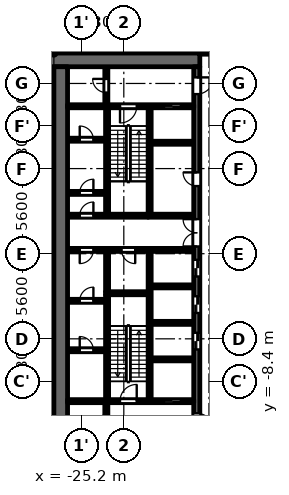
"""IFC4 building model, lengths in metres.
Left out: names, types, materials, properties, quantities, classifications, styles, units other than length and angle.
Written with IfcOpenShell. Run it as: python <this file> out.ifc"""

import sys

from ifc_helpers import new_model, si_unit, direction, frame, frame_2d, origin, place, context, subcontext, project, spatial, rectangle, extrude, element, fill, save


model = new_model("IFC4")
c1 = context("Model", 3, precision=1e-05, world=origin(), true_north=direction((0.0, 1.0)))
c2 = subcontext(c1, "Body", "Model", "MODEL_VIEW")
j1 = project(units=[si_unit("LENGTHUNIT", "METRE"), si_unit("PLANEANGLEUNIT", "RADIAN")], contexts=[c1])
p1 = place(None, origin())
s1 = spatial("IfcSite", under=j1, at=p1, CompositionType="ELEMENT")
p2 = place(p1, origin())
s2 = spatial("IfcBuilding", under=s1, at=p2, CompositionType="ELEMENT")
p3 = place(p2, frame((0.0, 0.0, 11.3)))
s3 = spatial("IfcBuildingStorey", under=s2, at=p3, CompositionType="ELEMENT", Elevation=11.3)
p4 = place(p3, frame((-23.5, -2.5, 0.0), z_axis=(0.0, 0.0, 1.0), x_axis=(0.0, 1.0, 0.0)))
e1 = element("IfcWall", 1, at=p4, inside=s3, PredefinedType="PARTITIONING", context=c2, shape_type="SweptSolid", body=[
    extrude(rectangle(XDim=2.65, YDim=0.2, at=frame_2d((1.325, 0.0))), origin(), (0.0, 0.0, 1.0), 4.45),
])
p5 = place(p3, frame((-20.7, 2.6, 0.0), z_axis=(0.0, 0.0, 1.0), x_axis=(0.0, 1.0, 0.0)))
e2 = element("IfcWall", 2, at=p5, inside=s3, PredefinedType="SHEAR", context=c2, shape_type="SweptSolid", body=[
    extrude(rectangle(XDim=7.0, YDim=0.2, at=frame_2d((3.5, 0.0))), origin(), (0.0, 0.0, 1.0), 4.45),
])
p6 = place(p3, frame((-20.7, -9.6, 0.0), z_axis=(0.0, 0.0, 1.0), x_axis=(0.0, 1.0, 0.0)))
e3 = element("IfcWall", 3, at=p6, inside=s3, PredefinedType="SHEAR", context=c2, shape_type="SweptSolid", body=[
    extrude(rectangle(XDim=9.75, YDim=0.2, at=frame_2d((4.875, 0.0))), origin(), (0.0, 0.0, 1.0), 4.45),
])
p7 = place(p3, frame((-20.8, 2.5, 0.0), z_axis=(0.0, 0.0, 1.0), x_axis=(-1.0, 0.0, 0.0)))
e4 = element("IfcWall", 4, at=p7, inside=s3, PredefinedType="SHEAR", context=c2, shape_type="SweptSolid", body=[
    extrude(rectangle(XDim=5.3, YDim=0.2, at=frame_2d((2.65, 0.0))), origin(), (0.0, 0.0, 1.0), 4.45),
])
p8 = place(p7, frame((3.6, 0.0, 0.0)))
e5 = element("IfcOpeningElement", 5, at=p8, cuts=e4, PredefinedType="OPENING", context=c2, shape_type="SweptSolid", body=[
    extrude(rectangle(XDim=0.9, YDim=2.1, at=frame_2d((0.45, 1.05))), frame((0.0, 0.11, 0.0), z_axis=(0.0, -1.0, 0.0), x_axis=(1.0, 0.0, 0.0)), (0.0, 0.0, 1.0), 0.22),
])
p9 = place(p3, frame((-20.8, 0.25, 0.0), z_axis=(0.0, 0.0, 1.0), x_axis=(-1.0, 0.0, 0.0)))
e6 = element("IfcWall", 6, at=p9, inside=s3, PredefinedType="PARTITIONING", context=c2, shape_type="SweptSolid", body=[
    extrude(rectangle(XDim=5.3, YDim=0.2, at=frame_2d((2.65, 0.0))), origin(), (0.0, 0.0, 1.0), 4.45),
])
p10 = place(p9, frame((0.85, 0.0, 0.0)))
e7 = element("IfcOpeningElement", 7, at=p10, cuts=e6, PredefinedType="OPENING", context=c2, shape_type="SweptSolid", body=[
    extrude(rectangle(XDim=0.9, YDim=2.1, at=frame_2d((0.45, 1.05))), frame((0.0, 0.11, 0.0), z_axis=(0.0, -1.0, 0.0), x_axis=(1.0, 0.0, 0.0)), (0.0, 0.0, 1.0), 0.22),
])
p11 = place(p9, frame((3.6, 0.0, 0.0)))
e8 = element("IfcOpeningElement", 8, at=p11, cuts=e6, PredefinedType="OPENING", context=c2, shape_type="SweptSolid", body=[
    extrude(rectangle(XDim=0.9, YDim=2.1, at=frame_2d((0.45, 1.05))), frame((0.0, 0.11, 0.0), z_axis=(0.0, -1.0, 0.0), x_axis=(1.0, 0.0, 0.0)), (0.0, 0.0, 1.0), 0.22),
])
p12 = place(p3, frame((-17.4, 12.75, 0.0), z_axis=(0.0, 0.0, 1.0), x_axis=(-1.0, 0.0, 0.0)))
e9 = element("IfcWall", 9, at=p12, inside=s3, PredefinedType="SHEAR", context=c2, shape_type="SweptSolid", body=[
    extrude(rectangle(XDim=10.4, YDim=0.9, at=frame_2d((5.2, 0.0))), origin(), (0.0, 0.0, 1.0), 4.45),
])
p13 = place(p3, frame((-17.6, -12.3, 0.0), z_axis=(0.0, 0.0, 1.0), x_axis=(0.0, 1.0, 0.0)))
e10 = element("IfcWall", 10, at=p13, inside=s3, PredefinedType="SHEAR", context=c2, shape_type="SweptSolid", body=[
    extrude(rectangle(XDim=24.6, YDim=0.4, at=frame_2d((12.3, 0.0))), origin(), (0.0, 0.0, 1.0), 4.45),
])
p14 = place(p13, frame((6.0, 0.0, 0.0)))
e11 = element("IfcOpeningElement", 11, at=p14, cuts=e10, PredefinedType="OPENING", context=c2, shape_type="SweptSolid", body=[
    extrude(rectangle(XDim=1.1, YDim=2.1, at=frame_2d((0.55, 1.05))), frame((0.0, 0.21, 0.0), z_axis=(0.0, -1.0, 0.0), x_axis=(1.0, 0.0, 0.0)), (0.0, 0.0, 1.0), 0.42),
])
p15 = place(p13, frame((8.4, 0.0, 0.0)))
e12 = element("IfcOpeningElement", 12, at=p15, cuts=e10, PredefinedType="OPENING", context=c2, shape_type="SweptSolid", body=[
    extrude(rectangle(XDim=1.1, YDim=2.1, at=frame_2d((0.55, 1.05))), frame((0.0, 0.21, 0.0), z_axis=(0.0, -1.0, 0.0), x_axis=(1.0, 0.0, 0.0)), (0.0, 0.0, 1.0), 0.42),
])
p16 = place(p13, frame((10.8, 0.0, 0.0)))
e13 = element("IfcOpeningElement", 13, at=p16, cuts=e10, PredefinedType="OPENING", context=c2, shape_type="SweptSolid", body=[
    extrude(rectangle(XDim=1.1, YDim=2.1, at=frame_2d((0.55, 1.05))), frame((0.0, 0.21, 0.0), z_axis=(0.0, -1.0, 0.0), x_axis=(1.0, 0.0, 0.0)), (0.0, 0.0, 1.0), 0.42),
])
p17 = place(p13, frame((16.75, 0.0, 0.0)))
e14 = element("IfcOpeningElement", 14, at=p17, cuts=e10, PredefinedType="OPENING", context=c2, shape_type="SweptSolid", body=[
    extrude(rectangle(XDim=0.9, YDim=2.1, at=frame_2d((0.45, 1.05))), frame((0.0, 0.21, 0.0), z_axis=(0.0, -1.0, 0.0), x_axis=(1.0, 0.0, 0.0)), (0.0, 0.0, 1.0), 0.42),
])
p18 = place(p13, frame((22.8, 0.0, 0.0)))
e15 = element("IfcOpeningElement", 15, at=p18, cuts=e10, PredefinedType="OPENING", context=c2, shape_type="SweptSolid", body=[
    extrude(rectangle(XDim=1.1, YDim=2.1, at=frame_2d((0.55, 1.05))), frame((0.0, 0.21, 0.0), z_axis=(0.0, -1.0, 0.0), x_axis=(1.0, 0.0, 0.0)), (0.0, 0.0, 1.0), 0.42),
])
p19 = place(p13, frame((0.7, 0.0, 0.0)))
e16 = element("IfcOpeningElement", 16, at=p19, cuts=e10, PredefinedType="OPENING", context=c2, shape_type="SweptSolid", body=[
    extrude(rectangle(XDim=1.1, YDim=2.1, at=frame_2d((0.55, 1.05))), frame((0.0, 0.21, 0.0), z_axis=(0.0, -1.0, 0.0), x_axis=(1.0, 0.0, 0.0)), (0.0, 0.0, 1.0), 0.42),
])
p20 = place(p13, frame((12.775, 0.0, 0.0)))
e17 = element("IfcOpeningElement", 17, at=p20, cuts=e10, PredefinedType="OPENING", context=c2, shape_type="SweptSolid", body=[
    extrude(rectangle(XDim=1.8, YDim=2.1, at=frame_2d((0.9, 1.05))), frame((0.0, 0.21, 0.0), z_axis=(0.0, -1.0, 0.0), x_axis=(1.0, 0.0, 0.0)), (0.0, 0.0, 1.0), 0.42),
])
p21 = place(p3, frame((-26.55, -12.3, 0.0), z_axis=(0.0, 0.0, 1.0), x_axis=(0.0, 1.0, 0.0)))
e18 = element("IfcWall", 18, at=p21, inside=s3, PredefinedType="SHEAR", context=c2, shape_type="SweptSolid", body=[
    extrude(rectangle(XDim=24.6, YDim=0.9, at=frame_2d((12.3, 0.0))), origin(), (0.0, 0.0, 1.0), 4.45),
])
p22 = place(p3, frame((-23.55, 9.8, 0.0), z_axis=(0.0, 0.0, 1.0), x_axis=(0.0, 1.0, 0.0)))
e19 = element("IfcWall", 19, at=p22, inside=s3, PredefinedType="PARTITIONING", context=c2, shape_type="SweptSolid", body=[
    extrude(rectangle(XDim=2.5, YDim=0.2, at=frame_2d((1.25, 0.0))), origin(), (0.0, 0.0, 1.0), 4.45),
])
p23 = place(p22, frame((0.8, 0.0, 0.0)))
e20 = element("IfcOpeningElement", 20, at=p23, cuts=e19, PredefinedType="OPENING", context=c2, shape_type="SweptSolid", body=[
    extrude(rectangle(XDim=0.9, YDim=2.1, at=frame_2d((0.45, 1.05))), frame((0.0, 0.11, 0.0), z_axis=(0.0, -1.0, 0.0), x_axis=(1.0, 0.0, 0.0)), (0.0, 0.0, 1.0), 0.22),
])
p24 = place(p3, frame((-23.55, -12.3, 0.0), z_axis=(0.0, 0.0, 1.0), x_axis=(0.0, 1.0, 0.0)))
e21 = element("IfcWall", 21, at=p24, inside=s3, PredefinedType="PARTITIONING", context=c2, shape_type="SweptSolid", body=[
    extrude(rectangle(XDim=2.5, YDim=0.2, at=frame_2d((1.25, 0.0))), origin(), (0.0, 0.0, 1.0), 4.45),
])
p25 = place(p24, frame((0.8, 0.0, 0.0)))
e22 = element("IfcOpeningElement", 22, at=p25, cuts=e21, PredefinedType="OPENING", context=c2, shape_type="SweptSolid", body=[
    extrude(rectangle(XDim=0.9, YDim=2.1, at=frame_2d((0.45, 1.05))), frame((0.0, 0.11, 0.0), z_axis=(0.0, -1.0, 0.0), x_axis=(1.0, 0.0, 0.0)), (0.0, 0.0, 1.0), 0.22),
])
p26 = place(p3, frame((-23.6, -6.35, 0.0), z_axis=(0.0, 0.0, 1.0), x_axis=(-1.0, 0.0, 0.0)))
e23 = element("IfcWall", 23, at=p26, inside=s3, PredefinedType="PARTITIONING", context=c2, shape_type="SweptSolid", body=[
    extrude(rectangle(XDim=2.5, YDim=0.2, at=frame_2d((1.25, 0.0))), origin(), (0.0, 0.0, 1.0), 4.45),
])
p27 = place(p26, frame((0.8, 0.0, 0.0)))
e24 = element("IfcOpeningElement", 24, at=p27, cuts=e23, PredefinedType="OPENING", context=c2, shape_type="SweptSolid", body=[
    extrude(rectangle(XDim=0.9, YDim=2.1, at=frame_2d((0.45, 1.05))), frame((0.0, 0.11, 0.0), z_axis=(0.0, -1.0, 0.0), x_axis=(1.0, 0.0, 0.0)), (0.0, 0.0, 1.0), 0.22),
])
p28 = place(p3, frame((-23.6, -3.1, 0.0), z_axis=(0.0, 0.0, 1.0), x_axis=(-1.0, 0.0, 0.0)))
e25 = element("IfcWall", 25, at=p28, inside=s3, PredefinedType="PARTITIONING", context=c2, shape_type="SweptSolid", body=[
    extrude(rectangle(XDim=2.5, YDim=0.2, at=frame_2d((1.25, 0.0))), origin(), (0.0, 0.0, 1.0), 4.45),
])
p29 = place(p28, frame((0.8, 0.0, 0.0)))
e26 = element("IfcOpeningElement", 26, at=p29, cuts=e25, PredefinedType="OPENING", context=c2, shape_type="SweptSolid", body=[
    extrude(rectangle(XDim=0.9, YDim=2.1, at=frame_2d((0.45, 1.05))), frame((0.0, 0.11, 0.0), z_axis=(0.0, -1.0, 0.0), x_axis=(1.0, 0.0, 0.0)), (0.0, 0.0, 1.0), 0.22),
])
p30 = place(p3, frame((-23.6, 4.0, 0.0), z_axis=(0.0, 0.0, 1.0), x_axis=(-1.0, 0.0, 0.0)))
e27 = element("IfcWall", 27, at=p30, inside=s3, PredefinedType="PARTITIONING", context=c2, shape_type="SweptSolid", body=[
    extrude(rectangle(XDim=2.5, YDim=0.2, at=frame_2d((1.25, 0.0))), origin(), (0.0, 0.0, 1.0), 4.45),
])
p31 = place(p30, frame((0.8, 0.0, 0.0)))
e28 = element("IfcOpeningElement", 28, at=p31, cuts=e27, PredefinedType="OPENING", context=c2, shape_type="SweptSolid", body=[
    extrude(rectangle(XDim=0.9, YDim=2.1, at=frame_2d((0.45, 1.05))), frame((0.0, 0.11, 0.0), z_axis=(0.0, -1.0, 0.0), x_axis=(1.0, 0.0, 0.0)), (0.0, 0.0, 1.0), 0.22),
])
p32 = place(p3, frame((-23.6, 7.5, 0.0), z_axis=(0.0, 0.0, 1.0), x_axis=(-1.0, 0.0, 0.0)))
e29 = element("IfcWall", 29, at=p32, inside=s3, PredefinedType="PARTITIONING", context=c2, shape_type="SweptSolid", body=[
    extrude(rectangle(XDim=2.5, YDim=0.2, at=frame_2d((1.25, 0.0))), origin(), (0.0, 0.0, 1.0), 4.45),
])
p33 = place(p32, frame((0.8, 0.0, 0.0)))
e30 = element("IfcOpeningElement", 30, at=p33, cuts=e29, PredefinedType="OPENING", context=c2, shape_type="SweptSolid", body=[
    extrude(rectangle(XDim=0.9, YDim=2.1, at=frame_2d((0.45, 1.05))), frame((0.0, 0.11, 0.0), z_axis=(0.0, -1.0, 0.0), x_axis=(1.0, 0.0, 0.0)), (0.0, 0.0, 1.0), 0.22),
])
p34 = place(p3, frame((-17.8, -9.7, 0.0), z_axis=(0.0, 0.0, 1.0), x_axis=(-1.0, 0.0, 0.0)))
e31 = element("IfcWall", 31, at=p34, inside=s3, PredefinedType="SHEAR", context=c2, shape_type="SweptSolid", body=[
    extrude(rectangle(XDim=8.3, YDim=0.2, at=frame_2d((4.15, 0.0))), origin(), (0.0, 0.0, 1.0), 4.45),
])
p35 = place(p34, frame((0.85, 0.0, 0.0)))
e32 = element("IfcOpeningElement", 32, at=p35, cuts=e31, PredefinedType="OPENING", context=c2, shape_type="SweptSolid", body=[
    extrude(rectangle(XDim=1.1, YDim=2.1, at=frame_2d((0.55, 1.05))), frame((0.0, 0.11, 0.0), z_axis=(0.0, -1.0, 0.0), x_axis=(1.0, 0.0, 0.0)), (0.0, 0.0, 1.0), 0.22),
])
p36 = place(p34, frame((3.75, 0.0, 0.0)))
e33 = element("IfcOpeningElement", 33, at=p36, cuts=e31, PredefinedType="OPENING", context=c2, shape_type="SweptSolid", body=[
    extrude(rectangle(XDim=1.1, YDim=2.1, at=frame_2d((0.55, 1.05))), frame((0.0, 0.11, 0.0), z_axis=(0.0, -1.0, 0.0), x_axis=(1.0, 0.0, 0.0)), (0.0, 0.0, 1.0), 0.22),
])
for number, where, z_axis, x_axis in (
    (34, (-17.8, -6.95, 0.0), (0.0, 0.0, 1.0), (-1.0, 0.0, 0.0)),
    (35, (-17.8, -4.55, 0.0), (0.0, 0.0, 1.0), (-1.0, 0.0, 0.0)),
    (36, (-17.8, -2.15, 0.0), (0.0, 0.0, 1.0), (-1.0, 0.0, 0.0)),
):
    element("IfcWall", number, at=place(p3, frame(where, z_axis=z_axis, x_axis=x_axis)), inside=s3, PredefinedType="PARTITIONING", context=c2, shape_type="SweptSolid", body=[
        extrude(rectangle(XDim=2.8, YDim=0.2, at=frame_2d((1.4, 0.0))), origin(), (0.0, 0.0, 1.0), 4.45),
    ])
for number, where, z_axis, x_axis in (
    (37, (-17.8, 0.25, 0.0), (0.0, 0.0, 1.0), (-1.0, 0.0, 0.0)),
    (38, (-17.8, 2.5, 0.0), (0.0, 0.0, 1.0), (-1.0, 0.0, 0.0)),
):
    element("IfcWall", number, at=place(p3, frame(where, z_axis=z_axis, x_axis=x_axis)), inside=s3, PredefinedType="PARTITIONING", context=c2, shape_type="SweptSolid", body=[
        extrude(rectangle(XDim=3.0, YDim=0.2, at=frame_2d((1.5, 0.0))), origin(), (0.0, 0.0, 1.0), 4.45),
    ])
p37 = place(p3, frame((-17.8, 7.3, 0.0), z_axis=(0.0, 0.0, 1.0), x_axis=(-1.0, 0.0, 0.0)))
e39 = element("IfcWall", 39, at=p37, inside=s3, PredefinedType="PARTITIONING", context=c2, shape_type="SweptSolid", body=[
    extrude(rectangle(XDim=2.8, YDim=0.2, at=frame_2d((1.4, 0.0))), origin(), (0.0, 0.0, 1.0), 4.45),
])
p38 = place(p3, frame((-17.8, 9.7, 0.0), z_axis=(0.0, 0.0, 1.0), x_axis=(-1.0, 0.0, 0.0)))
e40 = element("IfcWall", 40, at=p38, inside=s3, PredefinedType="SHEAR", context=c2, shape_type="SweptSolid", body=[
    extrude(rectangle(XDim=8.3, YDim=0.2, at=frame_2d((4.15, 0.0))), origin(), (0.0, 0.0, 1.0), 4.45),
])
p39 = place(p38, frame((0.85, 0.0, 0.0)))
e41 = element("IfcOpeningElement", 41, at=p39, cuts=e40, PredefinedType="OPENING", context=c2, shape_type="SweptSolid", body=[
    extrude(rectangle(XDim=1.1, YDim=2.1, at=frame_2d((0.55, 1.05))), frame((0.0, 0.11, 0.0), z_axis=(0.0, -1.0, 0.0), x_axis=(1.0, 0.0, 0.0)), (0.0, 0.0, 1.0), 0.22),
])
p40 = place(p38, frame((3.75, 0.0, 0.0)))
e42 = element("IfcOpeningElement", 42, at=p40, cuts=e40, PredefinedType="OPENING", context=c2, shape_type="SweptSolid", body=[
    extrude(rectangle(XDim=1.1, YDim=2.1, at=frame_2d((0.55, 1.05))), frame((0.0, 0.11, 0.0), z_axis=(0.0, -1.0, 0.0), x_axis=(1.0, 0.0, 0.0)), (0.0, 0.0, 1.0), 0.22),
])
p41 = place(p3, frame((-23.5, 2.6, 0.0), z_axis=(0.0, 0.0, 1.0), x_axis=(0.0, 1.0, 0.0)))
e43 = element("IfcWall", 43, at=p41, inside=s3, PredefinedType="SHEAR", context=c2, shape_type="SweptSolid", body=[
    extrude(rectangle(XDim=7.0, YDim=0.2, at=frame_2d((3.5, 0.0))), origin(), (0.0, 0.0, 1.0), 4.45),
])
p42 = place(p3, frame((-23.5, -9.6, 0.0), z_axis=(0.0, 0.0, 1.0), x_axis=(0.0, 1.0, 0.0)))
e44 = element("IfcWall", 44, at=p42, inside=s3, PredefinedType="SHEAR", context=c2, shape_type="SweptSolid", body=[
    extrude(rectangle(XDim=6.9, YDim=0.2, at=frame_2d((3.45, 0.0))), origin(), (0.0, 0.0, 1.0), 4.45),
])
p43 = place(p3, frame((-20.8, -2.6, 0.0), z_axis=(0.0, 0.0, 1.0), x_axis=(-1.0, 0.0, 0.0)))
e45 = element("IfcWall", 45, at=p43, inside=s3, PredefinedType="SHEAR", context=c2, shape_type="SweptSolid", body=[
    extrude(rectangle(XDim=2.8, YDim=0.2, at=frame_2d((1.4, 0.0))), origin(), (0.0, 0.0, 1.0), 4.45),
])
p44 = place(p3, frame((-17.4, 13.2, 0.0), z_axis=(0.0, 0.0, 1.0), x_axis=(1.0, 0.0, 0.0)))
e46 = element("IfcWall", 46, at=p44, inside=s3, PredefinedType="PARTITIONING", context=c2, shape_type="SweptSolid", body=[
    extrude(rectangle(XDim=34.8, YDim=0.15, at=frame_2d((17.4, 0.0))), origin(), (0.0, 0.0, 1.0), 4.45),
])
p45 = place(p44, frame((3.05, 0.0, 0.0)))
e47 = element("IfcOpeningElement", 47, at=p45, cuts=e46, PredefinedType="OPENING", context=c2, shape_type="SweptSolid", body=[
    extrude(rectangle(XDim=1.8, YDim=2.1, at=frame_2d((0.9, 1.05))), frame((0.0, 0.085, 0.0), z_axis=(0.0, -1.0, 0.0), x_axis=(1.0, 0.0, 0.0)), (0.0, 0.0, 1.0), 0.17),
])
p46 = place(p44, frame((0.75, 0.0, 0.0)))
e48 = element("IfcOpeningElement", 48, at=p46, cuts=e46, PredefinedType="OPENING", context=c2, shape_type="SweptSolid", body=[
    extrude(rectangle(XDim=1.0, YDim=2.1, at=frame_2d((0.5, 1.05))), frame((0.0, 0.085, 0.0), z_axis=(0.0, -1.0, 0.0), x_axis=(1.0, 0.0, 0.0)), (0.0, 0.0, 1.0), 0.17),
])
p47 = place(p44, frame((33.15, 0.0, 0.0)))
e49 = element("IfcOpeningElement", 49, at=p47, cuts=e46, PredefinedType="OPENING", context=c2, shape_type="SweptSolid", body=[
    extrude(rectangle(XDim=1.0, YDim=2.1, at=frame_2d((0.5, 1.05))), frame((0.0, 0.085, 0.0), z_axis=(0.0, -1.0, 0.0), x_axis=(1.0, 0.0, 0.0)), (0.0, 0.0, 1.0), 0.17),
])
p48 = place(p35, origin())
e50 = element("IfcDoor", 50, at=p48, inside=s3, OperationType="DOUBLE_DOOR_SLIDING", PredefinedType="DOOR", context=c2, shape_type="SweptSolid", body=[
    extrude(rectangle(XDim=1.1, YDim=2.1, at=frame_2d((0.55, 1.05))), frame((0.0, 0.025, 0.0), z_axis=(0.0, -1.0, 0.0), x_axis=(1.0, 0.0, 0.0)), (0.0, 0.0, 1.0), 0.05),
])
fill(e32, e50)
p49 = place(p14, origin())
e51 = element("IfcDoor", 51, at=p49, inside=s3, OperationType="DOUBLE_DOOR_SLIDING", PredefinedType="DOOR", context=c2, shape_type="SweptSolid", body=[
    extrude(rectangle(XDim=1.1, YDim=2.1, at=frame_2d((0.55, 1.05))), frame((0.0, 0.025, 0.0), z_axis=(0.0, -1.0, 0.0), x_axis=(1.0, 0.0, 0.0)), (0.0, 0.0, 1.0), 0.05),
])
fill(e11, e51)
p50 = place(p15, origin())
e52 = element("IfcDoor", 52, at=p50, inside=s3, OperationType="DOUBLE_DOOR_SLIDING", PredefinedType="DOOR", context=c2, shape_type="SweptSolid", body=[
    extrude(rectangle(XDim=1.1, YDim=2.1, at=frame_2d((0.55, 1.05))), frame((0.0, 0.025, 0.0), z_axis=(0.0, -1.0, 0.0), x_axis=(1.0, 0.0, 0.0)), (0.0, 0.0, 1.0), 0.05),
])
fill(e12, e52)
p51 = place(p16, origin())
e53 = element("IfcDoor", 53, at=p51, inside=s3, OperationType="DOUBLE_DOOR_SLIDING", PredefinedType="DOOR", context=c2, shape_type="SweptSolid", body=[
    extrude(rectangle(XDim=1.1, YDim=2.1, at=frame_2d((0.55, 1.05))), frame((0.0, 0.025, 0.0), z_axis=(0.0, -1.0, 0.0), x_axis=(1.0, 0.0, 0.0)), (0.0, 0.0, 1.0), 0.05),
])
fill(e13, e53)
p52 = place(p17, origin())
e54 = element("IfcDoor", 54, at=p52, inside=s3, OperationType="SINGLE_SWING_LEFT", PredefinedType="DOOR", context=c2, shape_type="SweptSolid", body=[
    extrude(rectangle(XDim=0.9, YDim=2.1, at=frame_2d((0.45, 1.05))), frame((0.0, 0.025, 0.0), z_axis=(0.0, -1.0, 0.0), x_axis=(1.0, 0.0, 0.0)), (0.0, 0.0, 1.0), 0.05),
])
fill(e14, e54)
p53 = place(p39, origin())
e55 = element("IfcDoor", 55, at=p53, inside=s3, OperationType="DOUBLE_DOOR_SLIDING", PredefinedType="DOOR", context=c2, shape_type="SweptSolid", body=[
    extrude(rectangle(XDim=1.1, YDim=2.1, at=frame_2d((0.55, 1.05))), frame((0.0, 0.025, 0.0), z_axis=(0.0, -1.0, 0.0), x_axis=(1.0, 0.0, 0.0)), (0.0, 0.0, 1.0), 0.05),
])
fill(e41, e55)
p54 = place(p18, origin())
e56 = element("IfcDoor", 56, at=p54, inside=s3, OperationType="SINGLE_SWING_RIGHT", PredefinedType="DOOR", context=c2, shape_type="SweptSolid", body=[
    extrude(rectangle(XDim=1.1, YDim=2.1, at=frame_2d((0.55, 1.05))), frame((0.0, 0.025, 0.0), z_axis=(0.0, -1.0, 0.0), x_axis=(1.0, 0.0, 0.0)), (0.0, 0.0, 1.0), 0.05),
])
fill(e15, e56)
p55 = place(p19, origin())
e57 = element("IfcDoor", 57, at=p55, inside=s3, OperationType="SINGLE_SWING_LEFT", PredefinedType="DOOR", context=c2, shape_type="SweptSolid", body=[
    extrude(rectangle(XDim=1.1, YDim=2.1, at=frame_2d((0.55, 1.05))), frame((0.0, 0.025, 0.0), z_axis=(0.0, -1.0, 0.0), x_axis=(1.0, 0.0, 0.0)), (0.0, 0.0, 1.0), 0.05),
])
fill(e16, e57)
p56 = place(p23, origin())
e58 = element("IfcDoor", 58, at=p56, inside=s3, OperationType="SINGLE_SWING_LEFT", PredefinedType="DOOR", context=c2, shape_type="SweptSolid", body=[
    extrude(rectangle(XDim=0.9, YDim=2.1, at=frame_2d((0.45, 1.05))), frame((0.0, 0.025, 0.0), z_axis=(0.0, -1.0, 0.0), x_axis=(1.0, 0.0, 0.0)), (0.0, 0.0, 1.0), 0.05),
])
fill(e20, e58)
p57 = place(p40, origin())
e59 = element("IfcDoor", 59, at=p57, inside=s3, OperationType="SINGLE_SWING_LEFT", PredefinedType="DOOR", context=c2, shape_type="SweptSolid", body=[
    extrude(rectangle(XDim=1.1, YDim=2.1, at=frame_2d((0.55, 1.05))), frame((0.0, 0.025, 0.0), z_axis=(0.0, -1.0, 0.0), x_axis=(1.0, 0.0, 0.0)), (0.0, 0.0, 1.0), 0.05),
])
fill(e42, e59)
p58 = place(p36, origin())
e60 = element("IfcDoor", 60, at=p58, inside=s3, OperationType="SINGLE_SWING_LEFT", PredefinedType="DOOR", context=c2, shape_type="SweptSolid", body=[
    extrude(rectangle(XDim=1.1, YDim=2.1, at=frame_2d((0.55, 1.05))), frame((0.0, 0.025, 0.0), z_axis=(0.0, -1.0, 0.0), x_axis=(1.0, 0.0, 0.0)), (0.0, 0.0, 1.0), 0.05),
])
fill(e33, e60)
p59 = place(p20, origin())
e61 = element("IfcDoor", 61, at=p59, inside=s3, OperationType="DOUBLE_DOOR_SINGLE_SWING", PredefinedType="DOOR", context=c2, shape_type="SweptSolid", body=[
    extrude(rectangle(XDim=1.8, YDim=2.1, at=frame_2d((0.9, 1.05))), frame((0.0, 0.025, 0.0), z_axis=(0.0, -1.0, 0.0), x_axis=(1.0, 0.0, 0.0)), (0.0, 0.0, 1.0), 0.05),
])
fill(e17, e61)
p60 = place(p10, origin())
e62 = element("IfcDoor", 62, at=p60, inside=s3, OperationType="SINGLE_SWING_RIGHT", PredefinedType="DOOR", context=c2, shape_type="SweptSolid", body=[
    extrude(rectangle(XDim=0.9, YDim=2.1, at=frame_2d((0.45, 1.05))), frame((0.0, 0.025, 0.0), z_axis=(0.0, -1.0, 0.0), x_axis=(1.0, 0.0, 0.0)), (0.0, 0.0, 1.0), 0.05),
])
fill(e7, e62)
p61 = place(p27, origin())
e63 = element("IfcDoor", 63, at=p61, inside=s3, OperationType="SINGLE_SWING_RIGHT", PredefinedType="DOOR", context=c2, shape_type="SweptSolid", body=[
    extrude(rectangle(XDim=0.9, YDim=2.1, at=frame_2d((0.45, 1.05))), frame((0.0, 0.025, 0.0), z_axis=(0.0, -1.0, 0.0), x_axis=(1.0, 0.0, 0.0)), (0.0, 0.0, 1.0), 0.05),
])
fill(e24, e63)
p62 = place(p29, origin())
e64 = element("IfcDoor", 64, at=p62, inside=s3, OperationType="SINGLE_SWING_LEFT", PredefinedType="DOOR", context=c2, shape_type="SweptSolid", body=[
    extrude(rectangle(XDim=0.9, YDim=2.1, at=frame_2d((0.45, 1.05))), frame((0.0, 0.025, 0.0), z_axis=(0.0, -1.0, 0.0), x_axis=(1.0, 0.0, 0.0)), (0.0, 0.0, 1.0), 0.05),
])
fill(e26, e64)
p63 = place(p11, origin())
e65 = element("IfcDoor", 65, at=p63, inside=s3, OperationType="SINGLE_SWING_LEFT", PredefinedType="DOOR", context=c2, shape_type="SweptSolid", body=[
    extrude(rectangle(XDim=0.9, YDim=2.1, at=frame_2d((0.45, 1.05))), frame((0.0, 0.025, 0.0), z_axis=(0.0, -1.0, 0.0), x_axis=(1.0, 0.0, 0.0)), (0.0, 0.0, 1.0), 0.05),
])
fill(e8, e65)
p64 = place(p31, origin())
e66 = element("IfcDoor", 66, at=p64, inside=s3, OperationType="SINGLE_SWING_LEFT", PredefinedType="DOOR", context=c2, shape_type="SweptSolid", body=[
    extrude(rectangle(XDim=0.9, YDim=2.1, at=frame_2d((0.45, 1.05))), frame((0.0, 0.025, 0.0), z_axis=(0.0, -1.0, 0.0), x_axis=(1.0, 0.0, 0.0)), (0.0, 0.0, 1.0), 0.05),
])
fill(e28, e66)
p65 = place(p33, origin())
e67 = element("IfcDoor", 67, at=p65, inside=s3, OperationType="SINGLE_SWING_RIGHT", PredefinedType="DOOR", context=c2, shape_type="SweptSolid", body=[
    extrude(rectangle(XDim=0.9, YDim=2.1, at=frame_2d((0.45, 1.05))), frame((0.0, 0.025, 0.0), z_axis=(0.0, -1.0, 0.0), x_axis=(1.0, 0.0, 0.0)), (0.0, 0.0, 1.0), 0.05),
])
fill(e30, e67)
p66 = place(p8, origin())
e68 = element("IfcDoor", 68, at=p66, inside=s3, OperationType="SINGLE_SWING_LEFT", PredefinedType="DOOR", context=c2, shape_type="SweptSolid", body=[
    extrude(rectangle(XDim=0.9, YDim=2.1, at=frame_2d((0.45, 1.05))), frame((0.0, 0.025, 0.0), z_axis=(0.0, -1.0, 0.0), x_axis=(1.0, 0.0, 0.0)), (0.0, 0.0, 1.0), 0.05),
])
fill(e5, e68)
save(model, sys.argv[1])
